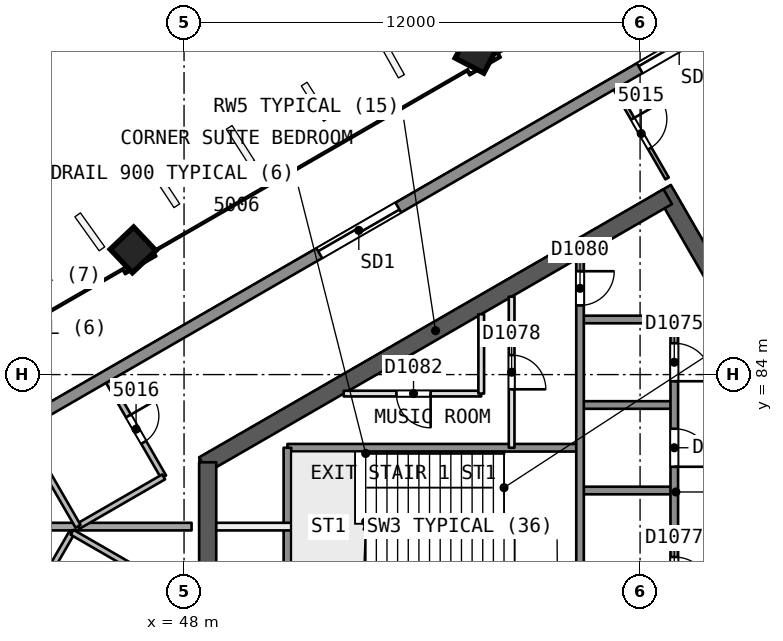
"""IFC4 building model, lengths in metres.
Left out: names, types, materials, properties, quantities, classifications, styles, units other than length and angle.
Written with IfcOpenShell. Run it as: python <this file> out.ifc"""

import sys

from ifc_helpers import new_model, si_unit, direction, frame, frame_2d, origin, origin_2d, place, context, subcontext, project, spatial, rectangle, extrude, element, fill, save


model = new_model("IFC4")
c1 = context("Model", 3, precision=1e-05, world=origin(), true_north=direction((0.0, 1.0)))
c2 = subcontext(c1, "Body", "Model", "MODEL_VIEW")
j1 = project(units=[si_unit("LENGTHUNIT", "METRE"), si_unit("PLANEANGLEUNIT", "RADIAN")], contexts=[c1])
p1 = place(None, origin())
s1 = spatial("IfcSite", under=j1, at=p1, CompositionType="ELEMENT")
p2 = place(p1, origin())
s2 = spatial("IfcBuilding", under=s1, at=p2, CompositionType="ELEMENT")
p3 = place(p2, frame((0.0, 0.0, 205.8)))
s3 = spatial("IfcBuildingStorey", under=s2, at=p3, CompositionType="ELEMENT", Elevation=205.8)
p4 = place(p3, frame((65.74, 80.0, 0.0), z_axis=(0.0, 0.0, 1.0), x_axis=(-0.499991857942, 0.866030104553, 0.0)))
e1 = element("IfcWall", 1, at=p4, inside=s3, PredefinedType="SHEAR", context=c2, shape_type="SweptSolid", body=[
    extrude(rectangle(XDim=10.25, YDim=0.45, at=frame_2d((5.125, 0.0))), origin(), (0.0, 0.0, 1.0), 3.7),
])
p5 = place(p4, frame((0.82, 0.0, 0.0)))
e2 = element("IfcOpeningElement", 2, at=p5, cuts=e1, PredefinedType="OPENING", context=c2, shape_type="SweptSolid", body=[
    extrude(rectangle(XDim=1.2, YDim=2.1, at=frame_2d((0.6, 1.05))), frame((0.0, 0.235, 0.0), z_axis=(0.0, -1.0, 0.0), x_axis=(1.0, 0.0, 0.0)), (0.0, 0.0, 1.0), 0.471),
])
p6 = place(p3, frame((60.728, 88.682, 0.0), z_axis=(0.0, 0.0, 1.0), x_axis=(-0.866021613849, -0.500006564303, 0.0)))
e3 = element("IfcWall", 3, at=p6, inside=s3, PredefinedType="SHEAR", context=c2, shape_type="SweptSolid", body=[
    extrude(rectangle(XDim=14.108, YDim=0.45, at=frame_2d((7.054, 0.0))), origin(), (0.0, 0.0, 1.0), 3.7),
])
p7 = place(p3, frame((48.622, 81.693, 0.0), z_axis=(0.0, 0.0, 1.0), x_axis=(0.0, -1.0, 0.0)))
e4 = element("IfcWall", 4, at=p7, inside=s3, PredefinedType="SHEAR", context=c2, shape_type="SweptSolid", body=[
    extrude(rectangle(XDim=3.515, YDim=0.45, at=frame_2d((1.758, 0.0))), origin(), (0.0, 0.0, 1.0), 3.7),
])
p8 = place(p3, frame((60.728, 71.318, 0.0), z_axis=(0.0, 0.0, 1.0), x_axis=(0.500012416173, 0.866018235185, 0.0)))
e5 = element("IfcWall", 5, at=p8, inside=s3, PredefinedType="SHEAR", context=c2, shape_type="SweptSolid", body=[
    extrude(rectangle(XDim=10.155, YDim=0.45, at=frame_2d((5.078, 0.0))), origin(), (0.0, 0.0, 1.0), 3.7),
])
p9 = place(p8, frame((8.005, 0.0, 0.0)))
e6 = element("IfcOpeningElement", 6, at=p9, cuts=e5, PredefinedType="OPENING", context=c2, shape_type="SweptSolid", body=[
    extrude(rectangle(XDim=1.2, YDim=2.1, at=frame_2d((0.6, 1.05))), frame((0.0, 0.235, 0.0), z_axis=(0.0, -1.0, 0.0), x_axis=(1.0, 0.0, 0.0)), (0.0, 0.0, 1.0), 0.471),
])
p10 = place(p3, frame((55.687, 92.521, 0.0), z_axis=(0.019328516974, -0.012138044789, 0.999739504221), x_axis=(-0.500208848309, 0.865669585777, 0.020181088508)))
e7 = element("IfcColumn", 7, at=p10, inside=s3, PredefinedType="COLUMN", context=c2, shape_type="SweptSolid", body=[
    extrude(rectangle(XDim=0.85, YDim=0.85, at=origin_2d()), origin(), (0.0, 0.0, 1.0), 3.701),
])
p11 = place(p3, frame((46.623, 87.289, 0.0), z_axis=(0.028559101991, -0.006859460986, 0.999568569678), x_axis=(-0.498522975518, 0.866641318896, 0.02019077173)))
e8 = element("IfcColumn", 8, at=p11, inside=s3, PredefinedType="COLUMN", context=c2, shape_type="SweptSolid", body=[
    extrude(rectangle(XDim=0.85, YDim=0.85, at=origin_2d()), origin(), (0.0, 0.0, 1.0), 3.702),
])
p12 = place(p3, frame((59.349, 91.52, 0.0), z_axis=(0.0, 0.0, 1.0), x_axis=(0.499957886064, -0.866049716911, 0.0)))
e9 = element("IfcWall", 9, at=p12, inside=s3, PredefinedType="PARTITIONING", context=c2, shape_type="SweptSolid", body=[
    extrude(rectangle(XDim=2.723, YDim=0.1, at=frame_2d((1.361, 0.0))), origin(), (0.0, 0.0, 1.0), 3.3),
])
p13 = place(p12, frame((0.911, 0.0, 0.0)))
e10 = element("IfcOpeningElement", 10, at=p13, cuts=e9, PredefinedType="OPENING", context=c2, shape_type="SweptSolid", body=[
    extrude(rectangle(XDim=0.9, YDim=2.1, at=frame_2d((0.45, 1.05))), frame((0.0, 0.061, 0.0), z_axis=(0.0, -1.0, 0.0), x_axis=(1.0, 0.0, 0.0)), (0.0, 0.0, 1.0), 0.121),
])
p14 = place(p3, frame((46.012, 83.82, 0.0), z_axis=(0.0, 0.0, 1.0), x_axis=(0.499987231761, -0.866032775405, 0.0)))
e11 = element("IfcWall", 11, at=p14, inside=s3, PredefinedType="PARTITIONING", context=c2, shape_type="SweptSolid", body=[
    extrude(rectangle(XDim=2.9, YDim=0.15, at=frame_2d((1.45, 0.0))), origin(), (0.0, 0.0, 1.0), 3.3),
])
p15 = place(p14, frame((1.05, 0.0, 0.0)))
e12 = element("IfcOpeningElement", 12, at=p15, cuts=e11, PredefinedType="OPENING", context=c2, shape_type="SweptSolid", body=[
    extrude(rectangle(XDim=0.8, YDim=2.1, at=frame_2d((0.4, 1.05))), frame((0.0, 0.085, 0.0), z_axis=(0.0, -1.0, 0.0), x_axis=(1.0, 0.0, 0.0)), (0.0, 0.0, 1.0), 0.171),
])
p16 = place(p3, frame((47.462, 81.308, 0.0), z_axis=(0.0, 0.0, 1.0), x_axis=(-0.866021400173, -0.500006934395, 0.0)))
e13 = element("IfcWall", 13, at=p16, inside=s3, PredefinedType="PARTITIONING", context=c2, shape_type="SweptSolid", body=[
    extrude(rectangle(XDim=2.6, YDim=0.15, at=frame_2d((1.3, 0.0))), origin(), (0.0, 0.0, 1.0), 3.3),
])
p17 = place(p3, frame((45.211, 80.008, 0.0), z_axis=(0.0, 0.0, 1.0), x_axis=(-0.499993655377, 0.866029066823, 0.0)))
e14 = element("IfcWall", 14, at=p17, inside=s3, PredefinedType="PARTITIONING", context=c2, shape_type="SweptSolid", body=[
    extrude(rectangle(XDim=2.779, YDim=0.15, at=frame_2d((1.39, 0.0))), origin(), (0.0, 0.0, 1.0), 3.3),
])
p18 = place(p3, frame((43.821, 80.0, 0.0), z_axis=(0.0, 0.0, 1.0), x_axis=(1.0, 0.0, 0.0)))
e15 = element("IfcWall", 15, at=p18, inside=s3, PredefinedType="PARTITIONING", context=c2, shape_type="SweptSolid", body=[
    extrude(rectangle(XDim=4.377, YDim=0.2, at=frame_2d((2.188, 0.0))), origin(), (0.0, 0.0, 1.0), 3.3),
])
p19 = place(p3, frame((43.821, 77.718, 0.0), z_axis=(0.0, 0.0, 1.0), x_axis=(0.49998543329, 0.866033813715, 0.0)))
e16 = element("IfcWall", 16, at=p19, inside=s3, PredefinedType="PARTITIONING", context=c2, shape_type="SweptSolid", body=[
    extrude(rectangle(XDim=2.464, YDim=0.15, at=frame_2d((1.232, 0.0))), origin(), (0.0, 0.0, 1.0), 3.3),
])
p20 = place(p3, frame((45.053, 79.852, 0.0), z_axis=(0.0, 0.0, 1.0), x_axis=(0.866021400173, -0.500006934395, 0.0)))
e17 = element("IfcWall", 17, at=p20, inside=s3, PredefinedType="PARTITIONING", context=c2, shape_type="SweptSolid", body=[
    extrude(rectangle(XDim=2.6, YDim=0.15, at=frame_2d((1.3, 0.0))), origin(), (0.0, 0.0, 1.0), 3.3),
])
p21 = place(p3, frame((43.672, 82.641, 0.0), z_axis=(0.0, 0.0, 1.0), x_axis=(0.866024917385, 0.500000842468, 0.0)))
e18 = element("IfcWall", 18, at=p21, inside=s3, PredefinedType="SOLIDWALL", context=c2, shape_type="SweptSolid", body=[
    extrude(rectangle(XDim=51.621, YDim=0.3, at=frame_2d((25.811, 0.0))), origin(), (0.0, 0.0, 1.0), 3.3),
])
p22 = place(p21, frame((24.611, 0.0, 0.0)))
e19 = element("IfcOpeningElement", 19, at=p22, cuts=e18, PredefinedType="OPENING", context=c2, shape_type="SweptSolid", body=[
    extrude(rectangle(XDim=2.4, YDim=2.4, at=frame_2d((1.2, 1.2))), frame((0.0, 0.161, 0.0), z_axis=(0.0, -1.0, 0.0), x_axis=(1.0, 0.0, 0.0)), (0.0, 0.0, 1.0), 0.321),
])
p23 = place(p21, frame((30.378, 0.0, 0.0)))
e20 = element("IfcOpeningElement", 20, at=p23, cuts=e18, PredefinedType="OPENING", context=c2, shape_type="SweptSolid", body=[
    extrude(rectangle(XDim=2.4, YDim=2.4, at=frame_2d((1.2, 1.2))), frame((0.0, 0.161, 0.0), z_axis=(0.0, -1.0, 0.0), x_axis=(1.0, 0.0, 0.0)), (0.0, 0.0, 1.0), 0.321),
])
p24 = place(p21, frame((40.147, 0.0, 0.0)))
e21 = element("IfcOpeningElement", 21, at=p24, cuts=e18, PredefinedType="OPENING", context=c2, shape_type="SweptSolid", body=[
    extrude(rectangle(XDim=2.4, YDim=2.4, at=frame_2d((1.2, 1.2))), frame((0.0, 0.161, 0.0), z_axis=(0.0, -1.0, 0.0), x_axis=(1.0, 0.0, 0.0)), (0.0, 0.0, 1.0), 0.321),
])
p25 = place(p21, frame((18.843, 0.0, 0.0)))
e22 = element("IfcOpeningElement", 22, at=p25, cuts=e18, PredefinedType="OPENING", context=c2, shape_type="SweptSolid", body=[
    extrude(rectangle(XDim=2.4, YDim=2.4, at=frame_2d((1.2, 1.2))), frame((0.0, 0.161, 0.0), z_axis=(0.0, -1.0, 0.0), x_axis=(1.0, 0.0, 0.0)), (0.0, 0.0, 1.0), 0.321),
])
p26 = place(p21, frame((9.107, 0.0, 0.0)))
e23 = element("IfcOpeningElement", 23, at=p26, cuts=e18, PredefinedType="OPENING", context=c2, shape_type="SweptSolid", body=[
    extrude(rectangle(XDim=2.4, YDim=2.4, at=frame_2d((1.2, 1.2))), frame((0.0, 0.161, 0.0), z_axis=(0.0, -1.0, 0.0), x_axis=(1.0, 0.0, 0.0)), (0.0, 0.0, 1.0), 0.321),
])
p27 = place(p3, frame((60.9, 85.45, 0.0), z_axis=(0.0, 0.0, 1.0), x_axis=(-1.0, 0.0, 0.0)))
e24 = element("IfcWall", 24, at=p27, inside=s3, PredefinedType="SOLIDWALL", context=c2, shape_type="SweptSolid", body=[
    extrude(rectangle(XDim=2.48, YDim=0.2, at=frame_2d((1.24, 0.0))), origin(), (0.0, 0.0, 1.0), 3.3),
])
p28 = place(p3, frame((55.82, 83.5, 0.0), z_axis=(0.0, 0.0, 1.0), x_axis=(-1.0, 0.0, 0.0)))
e25 = element("IfcWall", 25, at=p28, inside=s3, PredefinedType="PARTITIONING", context=c2, shape_type="SweptSolid", body=[
    extrude(rectangle(XDim=3.618, YDim=0.15, at=frame_2d((1.809, 0.0))), origin(), (0.0, 0.0, 1.0), 3.3),
])
p29 = place(p28, frame((1.332, 0.0, 0.0)))
e26 = element("IfcOpeningElement", 26, at=p29, cuts=e25, PredefinedType="OPENING", context=c2, shape_type="SweptSolid", body=[
    extrude(rectangle(XDim=0.9, YDim=2.1, at=frame_2d((0.45, 1.05))), frame((0.0, 0.085, 0.0), z_axis=(0.0, -1.0, 0.0), x_axis=(1.0, 0.0, 0.0)), (0.0, 0.0, 1.0), 0.171),
])
p30 = place(p3, frame((60.9, 83.2, 0.0), z_axis=(0.0, 0.0, 1.0), x_axis=(-1.0, 0.0, 0.0)))
e27 = element("IfcWall", 27, at=p30, inside=s3, PredefinedType="SOLIDWALL", context=c2, shape_type="SweptSolid", body=[
    extrude(rectangle(XDim=2.48, YDim=0.2, at=frame_2d((1.24, 0.0))), origin(), (0.0, 0.0, 1.0), 3.3),
])
p31 = place(p3, frame((58.42, 82.075, 0.0), z_axis=(0.0, 0.0, 1.0), x_axis=(-1.0, 0.0, 0.0)))
e28 = element("IfcWall", 28, at=p31, inside=s3, PredefinedType="SOLIDWALL", context=c2, shape_type="SweptSolid", body=[
    extrude(rectangle(XDim=7.7, YDim=0.2, at=frame_2d((3.85, 0.0))), origin(), (0.0, 0.0, 1.0), 3.3),
])
p32 = place(p3, frame((60.9, 80.95, 0.0), z_axis=(0.0, 0.0, 1.0), x_axis=(-1.0, 0.0, 0.0)))
e29 = element("IfcWall", 29, at=p32, inside=s3, PredefinedType="SOLIDWALL", context=c2, shape_type="SweptSolid", body=[
    extrude(rectangle(XDim=2.48, YDim=0.2, at=frame_2d((1.24, 0.0))), origin(), (0.0, 0.0, 1.0), 3.3),
])
p33 = place(p3, frame((50.82, 80.0, 0.0), z_axis=(0.0, 0.0, 1.0), x_axis=(-1.0, 0.0, 0.0)))
e30 = element("IfcWall", 30, at=p33, inside=s3, PredefinedType="PARTITIONING", context=c2, shape_type="SweptSolid", body=[
    extrude(rectangle(XDim=1.973, YDim=0.2, at=frame_2d((0.987, 0.0))), origin(), (0.0, 0.0, 1.0), 3.3),
])
p34 = place(p3, frame((60.9, 85.45, 0.0), z_axis=(0.0, 0.0, 1.0), x_axis=(0.0, -1.0, 0.0)))
e31 = element("IfcWall", 31, at=p34, inside=s3, PredefinedType="SOLIDWALL", context=c2, shape_type="SweptSolid", body=[
    extrude(rectangle(XDim=10.9, YDim=0.2, at=frame_2d((5.45, 0.0))), origin(), (0.0, 0.0, 1.0), 3.3),
])
p35 = place(p34, frame((0.625, 0.0, 0.0)))
e32 = element("IfcOpeningElement", 32, at=p35, cuts=e31, PredefinedType="OPENING", context=c2, shape_type="SweptSolid", body=[
    extrude(rectangle(XDim=1.0, YDim=2.1, at=frame_2d((0.5, 1.05))), frame((0.0, 0.11, 0.0), z_axis=(0.0, -1.0, 0.0), x_axis=(1.0, 0.0, 0.0)), (0.0, 0.0, 1.0), 0.221),
])
p36 = place(p34, frame((2.875, 0.0, 0.0)))
e33 = element("IfcOpeningElement", 33, at=p36, cuts=e31, PredefinedType="OPENING", context=c2, shape_type="SweptSolid", body=[
    extrude(rectangle(XDim=1.0, YDim=2.1, at=frame_2d((0.5, 1.05))), frame((0.0, 0.11, 0.0), z_axis=(0.0, -1.0, 0.0), x_axis=(1.0, 0.0, 0.0)), (0.0, 0.0, 1.0), 0.221),
])
p37 = place(p34, frame((6.25, 0.0, 0.0)))
e34 = element("IfcOpeningElement", 34, at=p37, cuts=e31, PredefinedType="OPENING", context=c2, shape_type="SweptSolid", body=[
    extrude(rectangle(XDim=1.0, YDim=2.1, at=frame_2d((0.5, 1.05))), frame((0.0, 0.11, 0.0), z_axis=(0.0, -1.0, 0.0), x_axis=(1.0, 0.0, 0.0)), (0.0, 0.0, 1.0), 0.221),
])
p38 = place(p3, frame((58.42, 87.09, 0.0), z_axis=(0.0, 0.0, 1.0), x_axis=(0.0, -1.0, 0.0)))
e35 = element("IfcWall", 35, at=p38, inside=s3, PredefinedType="SOLIDWALL", context=c2, shape_type="SweptSolid", body=[
    extrude(rectangle(XDim=10.64, YDim=0.2, at=frame_2d((5.32, 0.0))), origin(), (0.0, 0.0, 1.0), 3.3),
])
p39 = place(p38, frame((0.37, 0.0, 0.0)))
e36 = element("IfcOpeningElement", 36, at=p39, cuts=e35, PredefinedType="OPENING", context=c2, shape_type="SweptSolid", body=[
    extrude(rectangle(XDim=0.9, YDim=2.1, at=frame_2d((0.45, 1.05))), frame((0.0, 0.11, 0.0), z_axis=(0.0, -1.0, 0.0), x_axis=(1.0, 0.0, 0.0)), (0.0, 0.0, 1.0), 0.221),
])
p40 = place(p3, frame((56.62, 86.051, 0.0), z_axis=(0.0, 0.0, 1.0), x_axis=(0.0, -1.0, 0.0)))
e37 = element("IfcWall", 37, at=p40, inside=s3, PredefinedType="PARTITIONING", context=c2, shape_type="SweptSolid", body=[
    extrude(rectangle(XDim=3.976, YDim=0.15, at=frame_2d((1.988, 0.0))), origin(), (0.0, 0.0, 1.0), 3.3),
])
p41 = place(p40, frame((1.538, 0.0, 0.0)))
e38 = element("IfcOpeningElement", 38, at=p41, cuts=e37, PredefinedType="OPENING", context=c2, shape_type="SweptSolid", body=[
    extrude(rectangle(XDim=0.9, YDim=2.1, at=frame_2d((0.45, 1.05))), frame((0.0, 0.085, 0.0), z_axis=(0.0, -1.0, 0.0), x_axis=(1.0, 0.0, 0.0)), (0.0, 0.0, 1.0), 0.171),
])
p42 = place(p3, frame((55.82, 85.589, 0.0), z_axis=(0.0, 0.0, 1.0), x_axis=(0.0, -1.0, 0.0)))
e39 = element("IfcWall", 39, at=p42, inside=s3, PredefinedType="PARTITIONING", context=c2, shape_type="SweptSolid", body=[
    extrude(rectangle(XDim=2.089, YDim=0.15, at=frame_2d((1.044, 0.0))), origin(), (0.0, 0.0, 1.0), 3.3),
])
p43 = place(p3, frame((50.72, 82.075, 0.0), z_axis=(0.0, 0.0, 1.0), x_axis=(0.0, -1.0, 0.0)))
e40 = element("IfcWall", 40, at=p43, inside=s3, PredefinedType="SOLIDWALL", context=c2, shape_type="SweptSolid", body=[
    extrude(rectangle(XDim=4.15, YDim=0.2, at=frame_2d((2.075, 0.0))), origin(), (0.0, 0.0, 1.0), 3.3),
])
p44 = place(p13, origin())
e41 = element("IfcDoor", 41, at=p44, inside=s3, OperationType="SINGLE_SWING_LEFT", PredefinedType="NOTDEFINED", context=c2, shape_type="SweptSolid", body=[
    extrude(rectangle(XDim=0.9, YDim=2.1, at=frame_2d((0.45, 1.05))), frame((0.0, 0.025, 0.0), z_axis=(0.0, -1.0, 0.0), x_axis=(1.0, 0.0, 0.0)), (0.0, 0.0, 1.0), 0.05),
])
fill(e10, e41)
p45 = place(p15, origin())
e42 = element("IfcDoor", 42, at=p45, inside=s3, OperationType="SINGLE_SWING_LEFT", PredefinedType="NOTDEFINED", context=c2, shape_type="SweptSolid", body=[
    extrude(rectangle(XDim=0.8, YDim=2.1, at=frame_2d((0.4, 1.05))), frame((0.0, 0.025, 0.0), z_axis=(0.0, -1.0, 0.0), x_axis=(1.0, 0.0, 0.0)), (0.0, 0.0, 1.0), 0.05),
])
fill(e12, e42)
p46 = place(p25, origin())
e43 = element("IfcDoor", 43, at=p46, inside=s3, OperationType="SLIDING_TO_RIGHT", PredefinedType="NOTDEFINED", context=c2, shape_type="SweptSolid", body=[
    extrude(rectangle(XDim=2.4, YDim=2.4, at=frame_2d((1.2, 1.2))), frame((0.0, 0.025, 0.0), z_axis=(0.0, -1.0, 0.0), x_axis=(1.0, 0.0, 0.0)), (0.0, 0.0, 1.0), 0.05),
])
fill(e22, e43)
p47 = place(p26, origin())
e44 = element("IfcDoor", 44, at=p47, inside=s3, OperationType="SLIDING_TO_LEFT", PredefinedType="NOTDEFINED", context=c2, shape_type="SweptSolid", body=[
    extrude(rectangle(XDim=2.4, YDim=2.4, at=frame_2d((1.2, 1.2))), frame((0.0, 0.025, 0.0), z_axis=(0.0, -1.0, 0.0), x_axis=(1.0, 0.0, 0.0)), (0.0, 0.0, 1.0), 0.05),
])
fill(e23, e44)
p48 = place(p35, origin())
e45 = element("IfcDoor", 45, at=p48, inside=s3, OperationType="SINGLE_SWING_RIGHT", PredefinedType="NOTDEFINED", context=c2, shape_type="SweptSolid", body=[
    extrude(rectangle(XDim=1.0, YDim=2.1, at=frame_2d((0.5, 1.05))), frame((0.0, 0.025, 0.0), z_axis=(0.0, -1.0, 0.0), x_axis=(1.0, 0.0, 0.0)), (0.0, 0.0, 1.0), 0.05),
])
fill(e32, e45)
p49 = place(p36, origin())
e46 = element("IfcDoor", 46, at=p49, inside=s3, OperationType="SINGLE_SWING_RIGHT", PredefinedType="NOTDEFINED", context=c2, shape_type="SweptSolid", body=[
    extrude(rectangle(XDim=1.0, YDim=2.1, at=frame_2d((0.5, 1.05))), frame((0.0, 0.025, 0.0), z_axis=(0.0, -1.0, 0.0), x_axis=(1.0, 0.0, 0.0)), (0.0, 0.0, 1.0), 0.05),
])
fill(e33, e46)
p50 = place(p37, origin())
e47 = element("IfcDoor", 47, at=p50, inside=s3, OperationType="SINGLE_SWING_RIGHT", PredefinedType="NOTDEFINED", context=c2, shape_type="SweptSolid", body=[
    extrude(rectangle(XDim=1.0, YDim=2.1, at=frame_2d((0.5, 1.05))), frame((0.0, 0.025, 0.0), z_axis=(0.0, -1.0, 0.0), x_axis=(1.0, 0.0, 0.0)), (0.0, 0.0, 1.0), 0.05),
])
fill(e34, e47)
p51 = place(p41, origin())
e48 = element("IfcDoor", 48, at=p51, inside=s3, OperationType="SINGLE_SWING_RIGHT", PredefinedType="NOTDEFINED", context=c2, shape_type="SweptSolid", body=[
    extrude(rectangle(XDim=0.9, YDim=2.1, at=frame_2d((0.45, 1.05))), frame((0.0, 0.025, 0.0), z_axis=(0.0, -1.0, 0.0), x_axis=(1.0, 0.0, 0.0)), (0.0, 0.0, 1.0), 0.05),
])
fill(e38, e48)
p52 = place(p39, origin())
e49 = element("IfcDoor", 49, at=p52, inside=s3, OperationType="SINGLE_SWING_LEFT", PredefinedType="NOTDEFINED", context=c2, shape_type="SweptSolid", body=[
    extrude(rectangle(XDim=0.9, YDim=2.1, at=frame_2d((0.45, 1.05))), frame((0.0, 0.025, 0.0), z_axis=(0.0, -1.0, 0.0), x_axis=(1.0, 0.0, 0.0)), (0.0, 0.0, 1.0), 0.05),
])
fill(e36, e49)
p53 = place(p29, origin())
e50 = element("IfcDoor", 50, at=p53, inside=s3, OperationType="SINGLE_SWING_LEFT", PredefinedType="NOTDEFINED", context=c2, shape_type="SweptSolid", body=[
    extrude(rectangle(XDim=0.9, YDim=2.1, at=frame_2d((0.45, 1.05))), frame((0.0, 0.025, 0.0), z_axis=(0.0, -1.0, 0.0), x_axis=(1.0, 0.0, 0.0)), (0.0, 0.0, 1.0), 0.05),
])
fill(e26, e50)
save(model, sys.argv[1])
